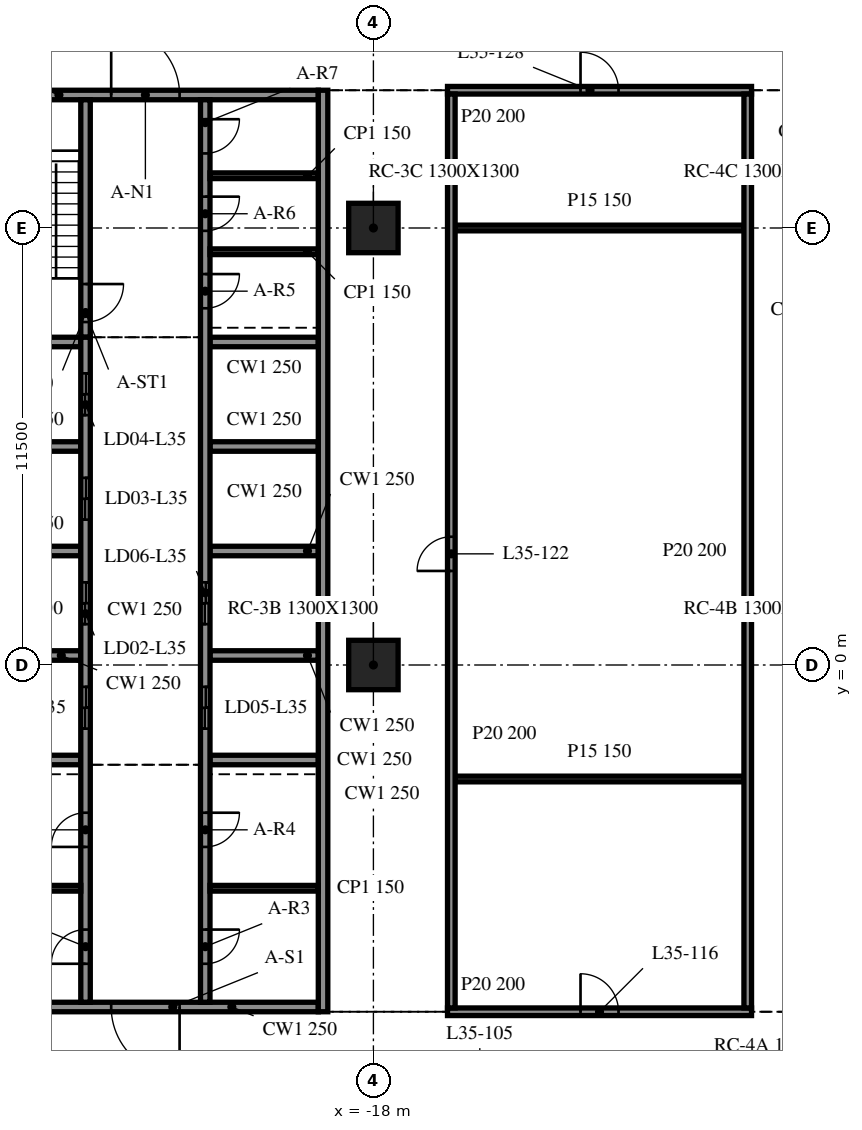
"""IFC4 building model, lengths in metres.
Left out: names, types, materials, properties, quantities, classifications, styles, units other than length and angle.
Written with IfcOpenShell. Run it as: python <this file> out.ifc"""

import sys

from ifc_helpers import new_model, si_unit, direction, frame, frame_2d, origin, origin_2d, place, context, subcontext, project, spatial, rectangle, extrude, element, fill, save


model = new_model("IFC4")
c1 = context("Model", 3, precision=1e-05, world=origin(), true_north=direction((0.0, 1.0)))
c2 = subcontext(c1, "Body", "Model", "MODEL_VIEW")
j1 = project(units=[si_unit("LENGTHUNIT", "METRE"), si_unit("PLANEANGLEUNIT", "RADIAN")], contexts=[c1])
p1 = place(None, origin())
s1 = spatial("IfcSite", under=j1, at=p1, CompositionType="ELEMENT")
p2 = place(p1, origin())
s2 = spatial("IfcBuilding", under=s1, at=p2, CompositionType="ELEMENT")
p3 = place(p2, frame((0.0, 0.0, 150.7)))
s3 = spatial("IfcBuildingStorey", under=s2, at=p3, CompositionType="ELEMENT", Elevation=150.7)
for number, where, z_axis, x_axis in (
    (1, (-18.0, 0.0, -0.34), (0.0, 0.0, 1.0), (1.0, 0.0, 0.0)),
    (2, (-18.0, 11.5, -0.34), (0.0, 0.0, 1.0), (1.0, 0.0, 0.0)),
):
    element("IfcColumn", number, at=place(p3, frame(where, z_axis=z_axis, x_axis=x_axis)), inside=s3, PredefinedType="COLUMN", context=c2, shape_type="SweptSolid", body=[
        extrude(rectangle(XDim=1.3, YDim=1.3, at=origin_2d()), origin(), (0.0, 0.0, 1.0), 3.89),
    ])
p4 = place(p3, frame((-19.325, -9.125, 0.0), z_axis=(0.0, 0.0, 1.0), x_axis=(0.0, 1.0, 0.0)))
e3 = element("IfcWall", 3, at=p4, inside=s3, PredefinedType="SOLIDWALL", context=c2, shape_type="SweptSolid", body=[
    extrude(rectangle(XDim=24.25, YDim=0.25, at=frame_2d((12.125, 0.0))), origin(), (0.0, 0.0, 1.0), 3.55),
])
p5 = place(p3, frame((-19.45, -9.0, 0.0), z_axis=(0.0, 0.0, 1.0), x_axis=(-1.0, 0.0, 0.0)))
e4 = element("IfcWall", 4, at=p5, inside=s3, PredefinedType="SOLIDWALL", context=c2, shape_type="SweptSolid", body=[
    extrude(rectangle(XDim=9.1, YDim=0.25, at=frame_2d((4.55, 0.0))), origin(), (0.0, 0.0, 1.0), 3.55),
])
p6 = place(p5, frame((3.65, 0.0, 0.0)))
e5 = element("IfcOpeningElement", 5, at=p6, cuts=e4, PredefinedType="OPENING", context=c2, shape_type="SweptSolid", body=[
    extrude(rectangle(XDim=1.8, YDim=2.1, at=frame_2d((0.9, 1.05))), frame((0.0, 0.135, 0.0), z_axis=(0.0, -1.0, 0.0), x_axis=(1.0, 0.0, 0.0)), (0.0, 0.0, 1.0), 0.27),
])
p7 = place(p3, frame((-28.55, 15.0, 0.0), z_axis=(0.0, 0.0, 1.0), x_axis=(1.0, 0.0, 0.0)))
e6 = element("IfcWall", 6, at=p7, inside=s3, PredefinedType="SOLIDWALL", context=c2, shape_type="SweptSolid", body=[
    extrude(rectangle(XDim=9.1, YDim=0.25, at=frame_2d((4.55, 0.0))), origin(), (0.0, 0.0, 1.0), 3.55),
])
p8 = place(p7, frame((3.65, 0.0, 0.0)))
e7 = element("IfcOpeningElement", 7, at=p8, cuts=e6, PredefinedType="OPENING", context=c2, shape_type="SweptSolid", body=[
    extrude(rectangle(XDim=1.8, YDim=2.1, at=frame_2d((0.9, 1.05))), frame((0.0, 0.135, 0.0), z_axis=(0.0, -1.0, 0.0), x_axis=(1.0, 0.0, 0.0)), (0.0, 0.0, 1.0), 0.27),
])
p9 = place(p3, frame((-25.575, -8.875, 0.0), z_axis=(0.0, 0.0, 1.0), x_axis=(0.0, 1.0, 0.0)))
e8 = element("IfcWall", 8, at=p9, inside=s3, PredefinedType="SOLIDWALL", context=c2, shape_type="SweptSolid", body=[
    extrude(rectangle(XDim=17.5, YDim=0.25, at=frame_2d((8.75, 0.0))), origin(), (0.0, 0.0, 1.0), 3.55),
])
p10 = place(p9, frame((7.2, 0.0, 0.0)))
e9 = element("IfcOpeningElement", 9, at=p10, cuts=e8, PredefinedType="OPENING", context=c2, shape_type="SweptSolid", body=[
    extrude(rectangle(XDim=1.1, YDim=2.1, at=frame_2d((0.55, 1.05))), frame((0.0, 0.135, 0.0), z_axis=(0.0, -1.0, 0.0), x_axis=(1.0, 0.0, 0.0)), (0.0, 0.0, 1.0), 0.27),
])
p11 = place(p9, frame((9.95, 0.0, 0.0)))
e10 = element("IfcOpeningElement", 10, at=p11, cuts=e8, PredefinedType="OPENING", context=c2, shape_type="SweptSolid", body=[
    extrude(rectangle(XDim=1.1, YDim=2.1, at=frame_2d((0.55, 1.05))), frame((0.0, 0.135, 0.0), z_axis=(0.0, -1.0, 0.0), x_axis=(1.0, 0.0, 0.0)), (0.0, 0.0, 1.0), 0.27),
])
p12 = place(p9, frame((12.7, 0.0, 0.0)))
e11 = element("IfcOpeningElement", 11, at=p12, cuts=e8, PredefinedType="OPENING", context=c2, shape_type="SweptSolid", body=[
    extrude(rectangle(XDim=1.1, YDim=2.1, at=frame_2d((0.55, 1.05))), frame((0.0, 0.135, 0.0), z_axis=(0.0, -1.0, 0.0), x_axis=(1.0, 0.0, 0.0)), (0.0, 0.0, 1.0), 0.27),
])
p13 = place(p9, frame((15.45, 0.0, 0.0)))
e12 = element("IfcOpeningElement", 12, at=p13, cuts=e8, PredefinedType="OPENING", context=c2, shape_type="SweptSolid", body=[
    extrude(rectangle(XDim=1.1, YDim=2.1, at=frame_2d((0.55, 1.05))), frame((0.0, 0.135, 0.0), z_axis=(0.0, -1.0, 0.0), x_axis=(1.0, 0.0, 0.0)), (0.0, 0.0, 1.0), 0.27),
])
p14 = place(p9, frame((1.012, 0.0, 0.0)))
e13 = element("IfcOpeningElement", 13, at=p14, cuts=e8, PredefinedType="OPENING", context=c2, shape_type="SweptSolid", body=[
    extrude(rectangle(XDim=0.9, YDim=2.1, at=frame_2d((0.45, 1.05))), frame((0.0, 0.135, 0.0), z_axis=(0.0, -1.0, 0.0), x_axis=(1.0, 0.0, 0.0)), (0.0, 0.0, 1.0), 0.27),
])
p15 = place(p9, frame((4.087, 0.0, 0.0)))
e14 = element("IfcOpeningElement", 14, at=p15, cuts=e8, PredefinedType="OPENING", context=c2, shape_type="SweptSolid", body=[
    extrude(rectangle(XDim=0.9, YDim=2.1, at=frame_2d((0.45, 1.05))), frame((0.0, 0.135, 0.0), z_axis=(0.0, -1.0, 0.0), x_axis=(1.0, 0.0, 0.0)), (0.0, 0.0, 1.0), 0.27),
])
p16 = place(p3, frame((-25.575, 14.875, 0.0), z_axis=(0.0, 0.0, 1.0), x_axis=(0.0, -1.0, 0.0)))
e15 = element("IfcWall", 15, at=p16, inside=s3, PredefinedType="SOLIDWALL", context=c2, shape_type="SweptSolid", body=[
    extrude(rectangle(XDim=6.25, YDim=0.25, at=frame_2d((3.125, 0.0))), origin(), (0.0, 0.0, 1.0), 3.55),
])
p17 = place(p16, frame((4.85, 0.0, 0.0)))
e16 = element("IfcOpeningElement", 16, at=p17, cuts=e15, PredefinedType="OPENING", context=c2, shape_type="SweptSolid", body=[
    extrude(rectangle(XDim=1.0, YDim=2.1, at=frame_2d((0.5, 1.05))), frame((0.0, 0.135, 0.0), z_axis=(0.0, -1.0, 0.0), x_axis=(1.0, 0.0, 0.0)), (0.0, 0.0, 1.0), 0.27),
])
p18 = place(p3, frame((-22.425, 14.875, 0.0), z_axis=(0.0, 0.0, 1.0), x_axis=(0.0, -1.0, 0.0)))
e17 = element("IfcWall", 17, at=p18, inside=s3, PredefinedType="SOLIDWALL", context=c2, shape_type="SweptSolid", body=[
    extrude(rectangle(XDim=23.75, YDim=0.25, at=frame_2d((11.875, 0.0))), origin(), (0.0, 0.0, 1.0), 3.55),
])
p19 = place(p18, frame((15.45, 0.0, 0.0)))
e18 = element("IfcOpeningElement", 18, at=p19, cuts=e17, PredefinedType="OPENING", context=c2, shape_type="SweptSolid", body=[
    extrude(rectangle(XDim=1.1, YDim=2.1, at=frame_2d((0.55, 1.05))), frame((0.0, 0.135, 0.0), z_axis=(0.0, -1.0, 0.0), x_axis=(1.0, 0.0, 0.0)), (0.0, 0.0, 1.0), 0.27),
])
p20 = place(p18, frame((12.7, 0.0, 0.0)))
e19 = element("IfcOpeningElement", 19, at=p20, cuts=e17, PredefinedType="OPENING", context=c2, shape_type="SweptSolid", body=[
    extrude(rectangle(XDim=1.1, YDim=2.1, at=frame_2d((0.55, 1.05))), frame((0.0, 0.135, 0.0), z_axis=(0.0, -1.0, 0.0), x_axis=(1.0, 0.0, 0.0)), (0.0, 0.0, 1.0), 0.27),
])
p21 = place(p18, frame((21.837, 0.0, 0.0)))
e20 = element("IfcOpeningElement", 20, at=p21, cuts=e17, PredefinedType="OPENING", context=c2, shape_type="SweptSolid", body=[
    extrude(rectangle(XDim=0.9, YDim=2.1, at=frame_2d((0.45, 1.05))), frame((0.0, 0.135, 0.0), z_axis=(0.0, -1.0, 0.0), x_axis=(1.0, 0.0, 0.0)), (0.0, 0.0, 1.0), 0.27),
])
p22 = place(p18, frame((18.762, 0.0, 0.0)))
e21 = element("IfcOpeningElement", 21, at=p22, cuts=e17, PredefinedType="OPENING", context=c2, shape_type="SweptSolid", body=[
    extrude(rectangle(XDim=0.9, YDim=2.1, at=frame_2d((0.45, 1.05))), frame((0.0, 0.135, 0.0), z_axis=(0.0, -1.0, 0.0), x_axis=(1.0, 0.0, 0.0)), (0.0, 0.0, 1.0), 0.27),
])
p23 = place(p18, frame((4.587, 0.0, 0.0)))
e22 = element("IfcOpeningElement", 22, at=p23, cuts=e17, PredefinedType="OPENING", context=c2, shape_type="SweptSolid", body=[
    extrude(rectangle(XDim=0.9, YDim=2.1, at=frame_2d((0.45, 1.05))), frame((0.0, 0.135, 0.0), z_axis=(0.0, -1.0, 0.0), x_axis=(1.0, 0.0, 0.0)), (0.0, 0.0, 1.0), 0.27),
])
p24 = place(p18, frame((2.55, 0.0, 0.0)))
e23 = element("IfcOpeningElement", 23, at=p24, cuts=e17, PredefinedType="OPENING", context=c2, shape_type="SweptSolid", body=[
    extrude(rectangle(XDim=0.9, YDim=2.1, at=frame_2d((0.45, 1.05))), frame((0.0, 0.135, 0.0), z_axis=(0.0, -1.0, 0.0), x_axis=(1.0, 0.0, 0.0)), (0.0, 0.0, 1.0), 0.27),
])
p25 = place(p18, frame((0.512, 0.0, 0.0)))
e24 = element("IfcOpeningElement", 24, at=p25, cuts=e17, PredefinedType="OPENING", context=c2, shape_type="SweptSolid", body=[
    extrude(rectangle(XDim=0.9, YDim=2.1, at=frame_2d((0.45, 1.05))), frame((0.0, 0.135, 0.0), z_axis=(0.0, -1.0, 0.0), x_axis=(1.0, 0.0, 0.0)), (0.0, 0.0, 1.0), 0.27),
])
for number, where, z_axis, x_axis in (
    (25, (-28.55, -2.5, 0.0), (0.0, 0.0, 1.0), (1.0, 0.0, 0.0)),
    (26, (-28.55, 0.25, 0.0), (0.0, 0.0, 1.0), (1.0, 0.0, 0.0)),
    (27, (-28.55, 3.0, 0.0), (0.0, 0.0, 1.0), (1.0, 0.0, 0.0)),
    (28, (-28.55, 5.75, 0.0), (0.0, 0.0, 1.0), (1.0, 0.0, 0.0)),
    (29, (-28.55, 8.5, 0.0), (0.0, 0.0, 1.0), (1.0, 0.0, 0.0)),
    (30, (-22.3, -2.5, 0.0), (0.0, 0.0, 1.0), (1.0, 0.0, 0.0)),
    (31, (-22.3, 0.25, 0.0), (0.0, 0.0, 1.0), (1.0, 0.0, 0.0)),
    (32, (-22.3, 3.0, 0.0), (0.0, 0.0, 1.0), (1.0, 0.0, 0.0)),
    (33, (-22.3, 5.75, 0.0), (0.0, 0.0, 1.0), (1.0, 0.0, 0.0)),
    (34, (-22.3, 8.5, 0.0), (0.0, 0.0, 1.0), (1.0, 0.0, 0.0)),
):
    element("IfcWall", number, at=place(p3, frame(where, z_axis=z_axis, x_axis=x_axis)), inside=s3, PredefinedType="SOLIDWALL", context=c2, shape_type="SweptSolid", body=[
        extrude(rectangle(XDim=2.85, YDim=0.25, at=frame_2d((1.425, 0.0))), origin(), (0.0, 0.0, 1.0), 3.55),
    ])
for number, where, z_axis, x_axis in (
    (35, (-28.55, -5.875, 0.0), (0.0, 0.0, 1.0), (1.0, 0.0, 0.0)),
    (36, (-22.3, -5.875, 0.0), (0.0, 0.0, 1.0), (1.0, 0.0, 0.0)),
    (37, (-22.3, 10.875, 0.0), (0.0, 0.0, 1.0), (1.0, 0.0, 0.0)),
    (38, (-22.3, 12.875, 0.0), (0.0, 0.0, 1.0), (1.0, 0.0, 0.0)),
):
    element("IfcWall", number, at=place(p3, frame(where, z_axis=z_axis, x_axis=x_axis)), inside=s3, PredefinedType="PARTITIONING", context=c2, shape_type="SweptSolid", body=[
        extrude(rectangle(XDim=2.85, YDim=0.15, at=frame_2d((1.425, 0.0))), origin(), (0.0, 0.0, 1.0), 3.55),
    ])
p26 = place(p3, frame((-16.05, -9.125, 0.0), z_axis=(0.0, 0.0, 1.0), x_axis=(1.0, 0.0, 0.0)))
e39 = element("IfcWall", 39, at=p26, inside=s3, PredefinedType="PARTITIONING", context=c2, shape_type="SweptSolid", body=[
    extrude(rectangle(XDim=8.0, YDim=0.2, at=frame_2d((4.0, 0.0))), origin(), (0.0, 0.0, 1.0), 3.55),
])
p27 = place(p26, frame((3.5, 0.0, 0.0)))
e40 = element("IfcOpeningElement", 40, at=p27, cuts=e39, PredefinedType="OPENING", context=c2, shape_type="SweptSolid", body=[
    extrude(rectangle(XDim=1.0, YDim=2.1, at=frame_2d((0.5, 1.05))), frame((0.0, 0.11, 0.0), z_axis=(0.0, -1.0, 0.0), x_axis=(1.0, 0.0, 0.0)), (0.0, 0.0, 1.0), 0.22),
])
for number, where, z_axis, x_axis in (
    (41, (-15.85, -3.0, 0.0), (0.0, 0.0, 1.0), (1.0, 0.0, 0.0)),
    (42, (-15.85, 11.5, 0.0), (0.0, 0.0, 1.0), (1.0, 0.0, 0.0)),
):
    element("IfcWall", number, at=place(p3, frame(where, z_axis=z_axis, x_axis=x_axis)), inside=s3, PredefinedType="PARTITIONING", context=c2, shape_type="SweptSolid", body=[
        extrude(rectangle(XDim=7.6, YDim=0.15, at=frame_2d((3.8, 0.0))), origin(), (0.0, 0.0, 1.0), 3.55),
    ])
p28 = place(p3, frame((-16.05, 15.125, 0.0), z_axis=(0.0, 0.0, 1.0), x_axis=(1.0, 0.0, 0.0)))
e43 = element("IfcWall", 43, at=p28, inside=s3, PredefinedType="PARTITIONING", context=c2, shape_type="SweptSolid", body=[
    extrude(rectangle(XDim=8.0, YDim=0.2, at=frame_2d((4.0, 0.0))), origin(), (0.0, 0.0, 1.0), 3.55),
])
p29 = place(p28, frame((3.5, 0.0, 0.0)))
e44 = element("IfcOpeningElement", 44, at=p29, cuts=e43, PredefinedType="OPENING", context=c2, shape_type="SweptSolid", body=[
    extrude(rectangle(XDim=1.0, YDim=2.1, at=frame_2d((0.5, 1.05))), frame((0.0, 0.11, 0.0), z_axis=(0.0, -1.0, 0.0), x_axis=(1.0, 0.0, 0.0)), (0.0, 0.0, 1.0), 0.22),
])
p30 = place(p3, frame((-15.95, -9.025, 0.0), z_axis=(0.0, 0.0, 1.0), x_axis=(0.0, 1.0, 0.0)))
e45 = element("IfcWall", 45, at=p30, inside=s3, PredefinedType="PARTITIONING", context=c2, shape_type="SweptSolid", body=[
    extrude(rectangle(XDim=24.05, YDim=0.2, at=frame_2d((12.025, 0.0))), origin(), (0.0, 0.0, 1.0), 3.55),
])
p31 = place(p30, frame((11.5, 0.0, 0.0)))
e46 = element("IfcOpeningElement", 46, at=p31, cuts=e45, PredefinedType="OPENING", context=c2, shape_type="SweptSolid", body=[
    extrude(rectangle(XDim=0.9, YDim=2.1, at=frame_2d((0.45, 1.05))), frame((0.0, 0.11, 0.0), z_axis=(0.0, -1.0, 0.0), x_axis=(1.0, 0.0, 0.0)), (0.0, 0.0, 1.0), 0.22),
])
p32 = place(p3, frame((-8.15, -9.025, 0.0), z_axis=(0.0, 0.0, 1.0), x_axis=(0.0, 1.0, 0.0)))
e47 = element("IfcWall", 47, at=p32, inside=s3, PredefinedType="PARTITIONING", context=c2, shape_type="SweptSolid", body=[
    extrude(rectangle(XDim=24.05, YDim=0.2, at=frame_2d((12.025, 0.0))), origin(), (0.0, 0.0, 1.0), 3.55),
])
p33 = place(p6, origin())
e48 = element("IfcDoor", 48, at=p33, inside=s3, OperationType="DOUBLE_DOOR_SINGLE_SWING", PredefinedType="DOOR", context=c2, shape_type="SweptSolid", body=[
    extrude(rectangle(XDim=1.8, YDim=2.1, at=frame_2d((0.9, 1.05))), frame((0.0, 0.025, 0.0), z_axis=(0.0, -1.0, 0.0), x_axis=(1.0, 0.0, 0.0)), (0.0, 0.0, 1.0), 0.05),
])
fill(e5, e48)
p34 = place(p8, origin())
e49 = element("IfcDoor", 49, at=p34, inside=s3, OperationType="DOUBLE_DOOR_SINGLE_SWING", PredefinedType="DOOR", context=c2, shape_type="SweptSolid", body=[
    extrude(rectangle(XDim=1.8, YDim=2.1, at=frame_2d((0.9, 1.05))), frame((0.0, 0.025, 0.0), z_axis=(0.0, -1.0, 0.0), x_axis=(1.0, 0.0, 0.0)), (0.0, 0.0, 1.0), 0.05),
])
fill(e7, e49)
p35 = place(p19, origin())
e50 = element("IfcDoor", 50, at=p35, inside=s3, OperationType="DOUBLE_DOOR_SLIDING", PredefinedType="DOOR", context=c2, shape_type="SweptSolid", body=[
    extrude(rectangle(XDim=1.1, YDim=2.1, at=frame_2d((0.55, 1.05))), frame((0.0, 0.025, 0.0), z_axis=(0.0, -1.0, 0.0), x_axis=(1.0, 0.0, 0.0)), (0.0, 0.0, 1.0), 0.05),
])
fill(e18, e50)
p36 = place(p20, origin())
e51 = element("IfcDoor", 51, at=p36, inside=s3, OperationType="DOUBLE_DOOR_SLIDING", PredefinedType="DOOR", context=c2, shape_type="SweptSolid", body=[
    extrude(rectangle(XDim=1.1, YDim=2.1, at=frame_2d((0.55, 1.05))), frame((0.0, 0.025, 0.0), z_axis=(0.0, -1.0, 0.0), x_axis=(1.0, 0.0, 0.0)), (0.0, 0.0, 1.0), 0.05),
])
fill(e19, e51)
p37 = place(p10, origin())
e52 = element("IfcDoor", 52, at=p37, inside=s3, OperationType="DOUBLE_DOOR_SLIDING", PredefinedType="DOOR", context=c2, shape_type="SweptSolid", body=[
    extrude(rectangle(XDim=1.1, YDim=2.1, at=frame_2d((0.55, 1.05))), frame((0.0, 0.025, 0.0), z_axis=(0.0, -1.0, 0.0), x_axis=(1.0, 0.0, 0.0)), (0.0, 0.0, 1.0), 0.05),
])
fill(e9, e52)
p38 = place(p11, origin())
e53 = element("IfcDoor", 53, at=p38, inside=s3, OperationType="DOUBLE_DOOR_SLIDING", PredefinedType="DOOR", context=c2, shape_type="SweptSolid", body=[
    extrude(rectangle(XDim=1.1, YDim=2.1, at=frame_2d((0.55, 1.05))), frame((0.0, 0.025, 0.0), z_axis=(0.0, -1.0, 0.0), x_axis=(1.0, 0.0, 0.0)), (0.0, 0.0, 1.0), 0.05),
])
fill(e10, e53)
p39 = place(p12, origin())
e54 = element("IfcDoor", 54, at=p39, inside=s3, OperationType="DOUBLE_DOOR_SLIDING", PredefinedType="DOOR", context=c2, shape_type="SweptSolid", body=[
    extrude(rectangle(XDim=1.1, YDim=2.1, at=frame_2d((0.55, 1.05))), frame((0.0, 0.025, 0.0), z_axis=(0.0, -1.0, 0.0), x_axis=(1.0, 0.0, 0.0)), (0.0, 0.0, 1.0), 0.05),
])
fill(e11, e54)
p40 = place(p13, origin())
e55 = element("IfcDoor", 55, at=p40, inside=s3, OperationType="DOUBLE_DOOR_SLIDING", PredefinedType="DOOR", context=c2, shape_type="SweptSolid", body=[
    extrude(rectangle(XDim=1.1, YDim=2.1, at=frame_2d((0.55, 1.05))), frame((0.0, 0.025, 0.0), z_axis=(0.0, -1.0, 0.0), x_axis=(1.0, 0.0, 0.0)), (0.0, 0.0, 1.0), 0.05),
])
fill(e12, e55)
p41 = place(p14, origin())
e56 = element("IfcDoor", 56, at=p41, inside=s3, OperationType="SINGLE_SWING_LEFT", PredefinedType="DOOR", context=c2, shape_type="SweptSolid", body=[
    extrude(rectangle(XDim=0.9, YDim=2.1, at=frame_2d((0.45, 1.05))), frame((0.0, 0.025, 0.0), z_axis=(0.0, -1.0, 0.0), x_axis=(1.0, 0.0, 0.0)), (0.0, 0.0, 1.0), 0.05),
])
fill(e13, e56)
p42 = place(p15, origin())
e57 = element("IfcDoor", 57, at=p42, inside=s3, OperationType="SINGLE_SWING_RIGHT", PredefinedType="DOOR", context=c2, shape_type="SweptSolid", body=[
    extrude(rectangle(XDim=0.9, YDim=2.1, at=frame_2d((0.45, 1.05))), frame((0.0, 0.025, 0.0), z_axis=(0.0, -1.0, 0.0), x_axis=(1.0, 0.0, 0.0)), (0.0, 0.0, 1.0), 0.05),
])
fill(e14, e57)
p43 = place(p21, origin())
e58 = element("IfcDoor", 58, at=p43, inside=s3, OperationType="SINGLE_SWING_LEFT", PredefinedType="DOOR", context=c2, shape_type="SweptSolid", body=[
    extrude(rectangle(XDim=0.9, YDim=2.1, at=frame_2d((0.45, 1.05))), frame((0.0, 0.025, 0.0), z_axis=(0.0, -1.0, 0.0), x_axis=(1.0, 0.0, 0.0)), (0.0, 0.0, 1.0), 0.05),
])
fill(e20, e58)
p44 = place(p22, origin())
e59 = element("IfcDoor", 59, at=p44, inside=s3, OperationType="SINGLE_SWING_RIGHT", PredefinedType="DOOR", context=c2, shape_type="SweptSolid", body=[
    extrude(rectangle(XDim=0.9, YDim=2.1, at=frame_2d((0.45, 1.05))), frame((0.0, 0.025, 0.0), z_axis=(0.0, -1.0, 0.0), x_axis=(1.0, 0.0, 0.0)), (0.0, 0.0, 1.0), 0.05),
])
fill(e21, e59)
p45 = place(p23, origin())
e60 = element("IfcDoor", 60, at=p45, inside=s3, OperationType="SINGLE_SWING_LEFT", PredefinedType="DOOR", context=c2, shape_type="SweptSolid", body=[
    extrude(rectangle(XDim=0.9, YDim=2.1, at=frame_2d((0.45, 1.05))), frame((0.0, 0.025, 0.0), z_axis=(0.0, -1.0, 0.0), x_axis=(1.0, 0.0, 0.0)), (0.0, 0.0, 1.0), 0.05),
])
fill(e22, e60)
p46 = place(p24, origin())
e61 = element("IfcDoor", 61, at=p46, inside=s3, OperationType="SINGLE_SWING_RIGHT", PredefinedType="DOOR", context=c2, shape_type="SweptSolid", body=[
    extrude(rectangle(XDim=0.9, YDim=2.1, at=frame_2d((0.45, 1.05))), frame((0.0, 0.025, 0.0), z_axis=(0.0, -1.0, 0.0), x_axis=(1.0, 0.0, 0.0)), (0.0, 0.0, 1.0), 0.05),
])
fill(e23, e61)
p47 = place(p25, origin())
e62 = element("IfcDoor", 62, at=p47, inside=s3, OperationType="SINGLE_SWING_LEFT", PredefinedType="DOOR", context=c2, shape_type="SweptSolid", body=[
    extrude(rectangle(XDim=0.9, YDim=2.1, at=frame_2d((0.45, 1.05))), frame((0.0, 0.025, 0.0), z_axis=(0.0, -1.0, 0.0), x_axis=(1.0, 0.0, 0.0)), (0.0, 0.0, 1.0), 0.05),
])
fill(e24, e62)
p48 = place(p17, origin())
e63 = element("IfcDoor", 63, at=p48, inside=s3, OperationType="SINGLE_SWING_RIGHT", PredefinedType="DOOR", context=c2, shape_type="SweptSolid", body=[
    extrude(rectangle(XDim=1.0, YDim=2.1, at=frame_2d((0.5, 1.05))), frame((0.0, 0.025, 0.0), z_axis=(0.0, -1.0, 0.0), x_axis=(1.0, 0.0, 0.0)), (0.0, 0.0, 1.0), 0.05),
])
fill(e16, e63)
p49 = place(p27, origin())
e64 = element("IfcDoor", 64, at=p49, inside=s3, OperationType="SINGLE_SWING_LEFT", PredefinedType="DOOR", context=c2, shape_type="SweptSolid", body=[
    extrude(rectangle(XDim=1.0, YDim=2.1, at=frame_2d((0.5, 1.05))), frame((0.0, 0.025, 0.0), z_axis=(0.0, -1.0, 0.0), x_axis=(1.0, 0.0, 0.0)), (0.0, 0.0, 1.0), 0.05),
])
fill(e40, e64)
p50 = place(p31, origin())
e65 = element("IfcDoor", 65, at=p50, inside=s3, OperationType="SINGLE_SWING_RIGHT", PredefinedType="DOOR", context=c2, shape_type="SweptSolid", body=[
    extrude(rectangle(XDim=0.9, YDim=2.1, at=frame_2d((0.45, 1.05))), frame((0.0, 0.025, 0.0), z_axis=(0.0, -1.0, 0.0), x_axis=(1.0, 0.0, 0.0)), (0.0, 0.0, 1.0), 0.05),
])
fill(e46, e65)
p51 = place(p29, origin())
e66 = element("IfcDoor", 66, at=p51, inside=s3, OperationType="SINGLE_SWING_RIGHT", PredefinedType="DOOR", context=c2, shape_type="SweptSolid", body=[
    extrude(rectangle(XDim=1.0, YDim=2.1, at=frame_2d((0.5, 1.05))), frame((0.0, 0.025, 0.0), z_axis=(0.0, -1.0, 0.0), x_axis=(1.0, 0.0, 0.0)), (0.0, 0.0, 1.0), 0.05),
])
fill(e44, e66)
save(model, sys.argv[1])
